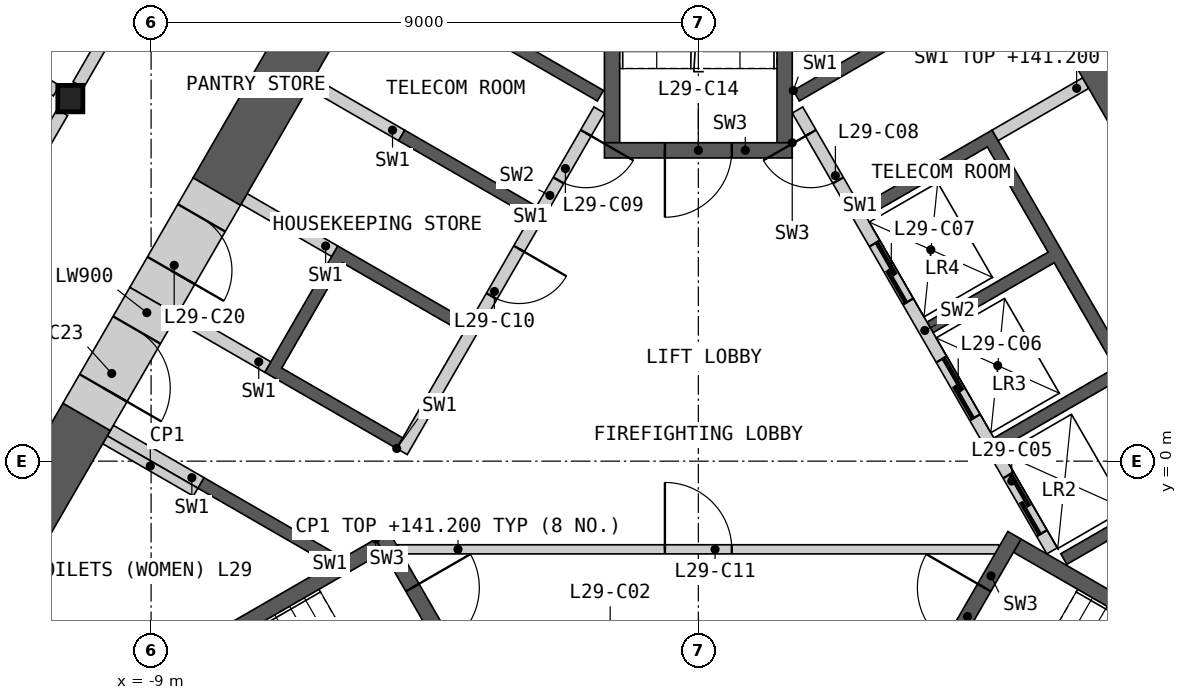
"""IFC4 building model, lengths in metres.
Left out: names, types, materials, properties, quantities, classifications, styles, units other than length and angle.
Written with IfcOpenShell. Run it as: python <this file> out.ifc"""

import sys

from ifc_helpers import new_model, si_unit, direction, frame, frame_2d, origin, origin_2d, place, context, subcontext, project, spatial, polyline, rectangle, i_section, outline, extrude, element, fill, save


model = new_model("IFC4")
c1 = context("Model", 3, precision=1e-05, world=origin(), true_north=direction((0.0, 1.0)))
c2 = subcontext(c1, "Body", "Model", "MODEL_VIEW")
j1 = project(units=[si_unit("LENGTHUNIT", "METRE"), si_unit("PLANEANGLEUNIT", "RADIAN")], contexts=[c1])
p1 = place(None, origin())
s1 = spatial("IfcSite", under=j1, at=p1, CompositionType="ELEMENT")
p2 = place(p1, origin())
s2 = spatial("IfcBuilding", under=s1, at=p2, CompositionType="ELEMENT")
p3 = place(p2, frame((0.0, 0.0, 137.4)))
s3 = spatial("IfcBuildingStorey", under=s2, at=p3, CompositionType="ELEMENT", Elevation=137.4)
p4 = place(p3, frame((-10.328, 5.963, 0.0), z_axis=(0.0, 0.0, 1.0), x_axis=(1.0, 0.0, 0.0)))
e1 = element("IfcColumn", 1, at=p4, inside=s3, PredefinedType="COLUMN", context=c2, shape_type="SweptSolid", body=[
    extrude(i_section(OverallWidth=0.412, OverallDepth=0.435, WebThickness=0.036, FlangeThickness=0.057, at=origin_2d()), origin(), (0.0, 0.0, 1.0), 4.2),
])
p5 = place(p3, origin())
e2 = element("IfcWall", 2, at=p5, inside=s3, PredefinedType="SHEAR", context=c2, shape_type="SweptSolid", body=[
    extrude(outline(polyline([(1.561, 6.097), (3.731, 7.35), (3.831, 7.177), (1.66, 5.924), (1.561, 6.097)])), origin(), (0.0, 0.0, 1.0), 3.8),
])
p6 = place(p3, origin())
e3 = element("IfcWall", 3, at=p6, inside=s3, PredefinedType="SHEAR", context=c2, shape_type="SweptSolid", body=[
    extrude(outline(polyline([(2.66, 4.192), (4.831, 5.445), (8.231, -0.444), (6.061, -1.697), (5.96, -1.524), (7.952, -0.374), (6.952, 1.358), (4.96, 0.208), (4.861, 0.381), (6.852, 1.531), (5.852, 3.263), (3.861, 2.113), (3.76, 2.287), (5.752, 3.437), (4.752, 5.169), (2.76, 4.019), (2.66, 4.192)])), origin(), (0.0, 0.0, 1.0), 3.8),
])
p7 = place(p3, frame((5.817, -1.476, 0.0), z_axis=(0.0, 0.0, 1.0), x_axis=(-0.500002616675, 0.866023893041, 0.0)))
e4 = element("IfcWall", 4, at=p7, inside=s3, PredefinedType="SOLIDWALL", context=c2, shape_type="SweptSolid", body=[
    extrude(rectangle(XDim=8.373, YDim=0.2, at=frame_2d((4.187, 0.0))), origin(), (0.0, 0.0, 1.0), 3.8),
])
p8 = place(p7, frame((0.337, 0.0, 0.0)))
e5 = element("IfcOpeningElement", 5, at=p8, cuts=e4, PredefinedType="OPENING", context=c2, shape_type="SweptSolid", body=[
    extrude(rectangle(XDim=1.1, YDim=2.1, at=frame_2d((0.55, 1.05))), frame((0.0, 0.11, 0.0), z_axis=(0.0, -1.0, 0.0), x_axis=(1.0, 0.0, 0.0)), (0.0, 0.0, 1.0), 0.22),
])
p9 = place(p7, frame((2.537, 0.0, 0.0)))
e6 = element("IfcOpeningElement", 6, at=p9, cuts=e4, PredefinedType="OPENING", context=c2, shape_type="SweptSolid", body=[
    extrude(rectangle(XDim=1.1, YDim=2.1, at=frame_2d((0.55, 1.05))), frame((0.0, 0.11, 0.0), z_axis=(0.0, -1.0, 0.0), x_axis=(1.0, 0.0, 0.0)), (0.0, 0.0, 1.0), 0.22),
])
p10 = place(p7, frame((4.737, 0.0, 0.0)))
e7 = element("IfcOpeningElement", 7, at=p10, cuts=e4, PredefinedType="OPENING", context=c2, shape_type="SweptSolid", body=[
    extrude(rectangle(XDim=1.1, YDim=2.1, at=frame_2d((0.55, 1.05))), frame((0.0, 0.11, 0.0), z_axis=(0.0, -1.0, 0.0), x_axis=(1.0, 0.0, 0.0)), (0.0, 0.0, 1.0), 0.22),
])
p11 = place(p7, frame((7.037, 0.0, 0.0)))
e8 = element("IfcOpeningElement", 8, at=p11, cuts=e4, PredefinedType="OPENING", context=c2, shape_type="SweptSolid", body=[
    extrude(rectangle(XDim=0.9, YDim=2.1, at=frame_2d((0.45, 1.05))), frame((0.0, 0.11, 0.0), z_axis=(0.0, -1.0, 0.0), x_axis=(1.0, 0.0, 0.0)), (0.0, 0.0, 1.0), 0.22),
])
p12 = place(p3, frame((4.881, 5.358, 0.0), z_axis=(0.0, 0.0, 1.0), x_axis=(0.866024871741, 0.500000921525, 0.0)))
e9 = element("IfcWall", 9, at=p12, inside=s3, PredefinedType="SHEAR", context=c2, shape_type="SweptSolid", body=[
    extrude(rectangle(XDim=1.72, YDim=0.2, at=frame_2d((0.86, 0.0))), origin(), (0.0, 0.0, 1.0), 3.8),
])
p13 = place(p3, origin())
e10 = element("IfcWall", 10, at=p13, inside=s3, PredefinedType="SHEAR", context=c2, shape_type="SweptSolid", body=[
    extrude(outline(polyline([(-6.061, -1.697), (-8.231, -0.444), (-8.131, -0.271), (-5.96, -1.524), (-6.061, -1.697)])), origin(), (0.0, 0.0, 1.0), 3.8),
])
p14 = place(p3, origin())
e11 = element("IfcWall", 11, at=p14, inside=s3, PredefinedType="SHEAR", context=c2, shape_type="SweptSolid", body=[
    extrude(outline(polyline([(-4.96, 0.208), (-7.131, 1.461), (-5.931, 3.54), (-3.76, 2.287), (-3.861, 2.113), (-5.852, 3.263), (-6.852, 1.531), (-4.861, 0.381), (-4.96, 0.208)])), origin(), (0.0, 0.0, 1.0), 3.8),
])
p15 = place(p3, origin())
e12 = element("IfcWall", 12, at=p15, inside=s3, PredefinedType="SHEAR", context=c2, shape_type="SweptSolid", body=[
    extrude(outline(polyline([(-2.76, 4.019), (-4.931, 5.272), (-4.831, 5.445), (-2.66, 4.192), (-2.76, 4.019)])), origin(), (0.0, 0.0, 1.0), 3.8),
])
p16 = place(p3, origin())
e13 = element("IfcWall", 13, at=p16, inside=s3, PredefinedType="SHEAR", context=c2, shape_type="SweptSolid", body=[
    extrude(outline(polyline([(-3.731, 7.35), (-1.561, 6.097), (-1.66, 5.924), (-3.831, 7.177), (-3.731, 7.35)])), origin(), (0.0, 0.0, 1.0), 3.8),
])
p17 = place(p3, frame((-1.631, 5.776, 0.0), z_axis=(0.0, 0.0, 1.0), x_axis=(-0.499992876559, -0.866029516466, 0.0)))
e14 = element("IfcWall", 14, at=p17, inside=s3, PredefinedType="SOLIDWALL", context=c2, shape_type="SweptSolid", body=[
    extrude(rectangle(XDim=6.486, YDim=0.2, at=frame_2d((3.243, 0.0))), origin(), (0.0, 0.0, 1.0), 3.8),
])
p18 = place(p17, frame((0.437, 0.0, 0.0)))
e15 = element("IfcOpeningElement", 15, at=p18, cuts=e14, PredefinedType="OPENING", context=c2, shape_type="SweptSolid", body=[
    extrude(rectangle(XDim=0.9, YDim=2.1, at=frame_2d((0.45, 1.05))), frame((0.0, 0.11, 0.0), z_axis=(0.0, -1.0, 0.0), x_axis=(1.0, 0.0, 0.0)), (0.0, 0.0, 1.0), 0.22),
])
p19 = place(p17, frame((2.637, 0.0, 0.0)))
e16 = element("IfcOpeningElement", 16, at=p19, cuts=e14, PredefinedType="OPENING", context=c2, shape_type="SweptSolid", body=[
    extrude(rectangle(XDim=0.9, YDim=2.1, at=frame_2d((0.45, 1.05))), frame((0.0, 0.11, 0.0), z_axis=(0.0, -1.0, 0.0), x_axis=(1.0, 0.0, 0.0)), (0.0, 0.0, 1.0), 0.22),
])
p20 = place(p3, frame((-4.881, 5.358, 0.0), z_axis=(0.0, 0.0, 1.0), x_axis=(-0.866024871741, 0.500000921525, 0.0)))
e17 = element("IfcWall", 17, at=p20, inside=s3, PredefinedType="SHEAR", context=c2, shape_type="SweptSolid", body=[
    extrude(rectangle(XDim=1.72, YDim=0.2, at=frame_2d((0.86, 0.0))), origin(), (0.0, 0.0, 1.0), 3.8),
])
p21 = place(p3, frame((-5.981, 3.453, 0.0), z_axis=(0.0, 0.0, 1.0), x_axis=(-0.866060346521, 0.499939472521, 0.0)))
e18 = element("IfcWall", 18, at=p21, inside=s3, PredefinedType="SHEAR", context=c2, shape_type="SweptSolid", body=[
    extrude(rectangle(XDim=1.72, YDim=0.2, at=frame_2d((0.86, 0.0))), origin(), (0.0, 0.0, 1.0), 3.8),
])
for number, where, z_axis, x_axis in (
    (19, (-7.081, 1.548, 0.0), (0.0, 0.0, 1.0), (-0.866, 0.5, 0.0)),
    (20, (-8.181, -0.357, 0.0), (0.0, 0.0, 1.0), (-0.866, 0.5, 0.0)),
):
    element("IfcWall", number, at=place(p3, frame(where, z_axis=z_axis, x_axis=x_axis)), inside=s3, PredefinedType="SHEAR", context=c2, shape_type="SweptSolid", body=[
        extrude(rectangle(XDim=1.72, YDim=0.2, at=frame_2d((0.86, 0.0))), origin(), (0.0, 0.0, 1.0), 3.8),
    ])
p22 = place(p3, frame((-4.941, -1.45, 0.0), z_axis=(0.0, 0.0, 1.0), x_axis=(1.0, 0.0, 0.0)))
e21 = element("IfcWall", 21, at=p22, inside=s3, PredefinedType="PARTITIONING", context=c2, shape_type="SweptSolid", body=[
    extrude(rectangle(XDim=9.882, YDim=0.15, at=frame_2d((4.941, 0.0))), origin(), (0.0, 0.0, 1.0), 3.8),
])
p23 = place(p22, frame((4.391, 0.0, 0.0)))
e22 = element("IfcOpeningElement", 22, at=p23, cuts=e21, PredefinedType="OPENING", context=c2, shape_type="SweptSolid", body=[
    extrude(rectangle(XDim=1.1, YDim=2.1, at=frame_2d((0.55, 1.05))), frame((0.0, 0.085, 0.0), z_axis=(0.0, -1.0, 0.0), x_axis=(1.0, 0.0, 0.0)), (0.0, 0.0, 1.0), 0.17),
])
p24 = place(p3, origin())
e23 = element("IfcWall", 23, at=p24, inside=s3, PredefinedType="SHEAR", context=c2, shape_type="SweptSolid", body=[
    extrude(outline(polyline([(-5.307, -1.281), (-10.374, -4.206), (-10.032, -4.298), (-5.182, -1.498), (-5.307, -1.281)])), origin(), (0.0, 0.0, 1.0), 3.8),
])
p25 = place(p3, frame((-5.199, -1.219, 0.0), z_axis=(0.0, 0.0, 1.0), x_axis=(0.499982516597, -0.866035497597, 0.0)))
e24 = element("IfcWall", 24, at=p25, inside=s3, PredefinedType="SHEAR", context=c2, shape_type="SweptSolid", body=[
    extrude(rectangle(XDim=3.088, YDim=0.25, at=frame_2d((1.544, 0.0))), origin(), (0.0, 0.0, 1.0), 3.8),
])
p26 = place(p25, frame((0.994, 0.0, 0.0)))
e25 = element("IfcOpeningElement", 25, at=p26, cuts=e24, PredefinedType="OPENING", context=c2, shape_type="SweptSolid", body=[
    extrude(rectangle(XDim=1.1, YDim=2.1, at=frame_2d((0.55, 1.05))), frame((0.0, 0.135, 0.0), z_axis=(0.0, -1.0, 0.0), x_axis=(1.0, 0.0, 0.0)), (0.0, 0.0, 1.0), 0.27),
])
p27 = place(p3, origin())
e26 = element("IfcWall", 26, at=p27, inside=s3, PredefinedType="SHEAR", context=c2, shape_type="SweptSolid", body=[
    extrude(outline(polyline([(10.032, -4.298), (10.374, -4.206), (5.307, -1.281), (5.182, -1.498), (10.032, -4.298)])), origin(), (0.0, 0.0, 1.0), 3.8),
])
p28 = place(p3, frame((3.655, -3.893, 0.0), z_axis=(0.0, 0.0, 1.0), x_axis=(0.499982516597, 0.866035497597, 0.0)))
e27 = element("IfcWall", 27, at=p28, inside=s3, PredefinedType="SHEAR", context=c2, shape_type="SweptSolid", body=[
    extrude(rectangle(XDim=3.088, YDim=0.25, at=frame_2d((1.544, 0.0))), origin(), (0.0, 0.0, 1.0), 3.8),
])
p29 = place(p28, frame((0.994, 0.0, 0.0)))
e28 = element("IfcOpeningElement", 28, at=p29, cuts=e27, PredefinedType="OPENING", context=c2, shape_type="SweptSolid", body=[
    extrude(rectangle(XDim=1.1, YDim=2.1, at=frame_2d((0.55, 1.05))), frame((0.0, 0.135, 0.0), z_axis=(0.0, -1.0, 0.0), x_axis=(1.0, 0.0, 0.0)), (0.0, 0.0, 1.0), 0.27),
])
p30 = place(p3, origin())
e29 = element("IfcWall", 29, at=p30, inside=s3, PredefinedType="SHEAR", context=c2, shape_type="SweptSolid", body=[
    extrude(outline(polyline([(1.544, 5.237), (1.544, 11.087), (1.294, 10.837), (1.294, 5.237), (1.544, 5.237)])), origin(), (0.0, 0.0, 1.0), 3.8),
])
p31 = place(p3, origin())
e30 = element("IfcWall", 30, at=p31, inside=s3, PredefinedType="SHEAR", context=c2, shape_type="SweptSolid", body=[
    extrude(outline(polyline([(-1.294, 10.837), (-1.544, 11.087), (-1.544, 5.237), (-1.294, 5.237), (-1.294, 10.837)])), origin(), (0.0, 0.0, 1.0), 3.8),
])
p32 = place(p3, frame((1.544, 5.112, 0.0), z_axis=(0.0, 0.0, 1.0), x_axis=(-1.0, 0.0, 0.0)))
e31 = element("IfcWall", 31, at=p32, inside=s3, PredefinedType="SHEAR", context=c2, shape_type="SweptSolid", body=[
    extrude(rectangle(XDim=3.088, YDim=0.25, at=frame_2d((1.544, 0.0))), origin(), (0.0, 0.0, 1.0), 3.8),
])
p33 = place(p32, frame((0.994, 0.0, 0.0)))
e32 = element("IfcOpeningElement", 32, at=p33, cuts=e31, PredefinedType="OPENING", context=c2, shape_type="SweptSolid", body=[
    extrude(rectangle(XDim=1.1, YDim=2.1, at=frame_2d((0.55, 1.05))), frame((0.0, 0.135, 0.0), z_axis=(0.0, -1.0, 0.0), x_axis=(1.0, 0.0, 0.0)), (0.0, 0.0, 1.0), 0.27),
])
p34 = place(p3, frame((-8.268, -0.509, 0.0), z_axis=(0.0, 0.0, 1.0), x_axis=(-0.866024871741, 0.500000921525, 0.0)))
e33 = element("IfcWall", 33, at=p34, inside=s3, PredefinedType="PARTITIONING", context=c2, shape_type="SweptSolid", body=[
    extrude(rectangle(XDim=1.72, YDim=0.15, at=frame_2d((0.86, 0.0))), origin(), (0.0, 0.0, 1.0), 3.8),
])
p35 = place(p3, frame((10.521, -0.07, 0.0), z_axis=(0.0, 0.0, 1.0), x_axis=(-0.499997384719, 0.866026913713, 0.0)))
e34 = element("IfcWall", 34, at=p35, inside=s3, PredefinedType="SHEAR", context=c2, shape_type="SweptSolid", body=[
    extrude(rectangle(XDim=10.249, YDim=0.9, at=frame_2d((5.125, 0.0))), origin(), (0.0, 0.0, 1.0), 3.8),
])
p36 = place(p3, frame((-3.512, 12.069, 0.0), z_axis=(0.0, 0.0, 1.0), x_axis=(-0.500002126466, -0.866024176065, 0.0)))
e35 = element("IfcWall", 35, at=p36, inside=s3, PredefinedType="SHEAR", context=c2, shape_type="SweptSolid", body=[
    extrude(rectangle(XDim=8.816, YDim=0.9, at=frame_2d((4.408, 0.0))), origin(), (0.0, 0.0, 1.0), 3.8),
])
p37 = place(p3, frame((-10.06, 0.728, 0.0), z_axis=(0.0, 0.0, 1.0), x_axis=(-0.500002975332, -0.866023685969, 0.0)))
e36 = element("IfcWall", 36, at=p37, inside=s3, PredefinedType="SHEAR", context=c2, shape_type="SweptSolid", body=[
    extrude(rectangle(XDim=6.429, YDim=0.9, at=frame_2d((3.214, 0.0))), origin(), (0.0, 0.0, 1.0), 3.8),
])
p38 = place(p3, frame((-7.92, 4.434, 0.0), z_axis=(0.0, 0.0, 1.0), x_axis=(-0.499939227269, -0.866060488094, 0.0)))
e37 = element("IfcWall", 37, at=p38, inside=s3, PredefinedType="SHEAR", context=c2, shape_type="SweptSolid", body=[
    extrude(rectangle(XDim=2.08, YDim=0.9, at=frame_2d((1.04, 0.0))), origin(), (0.0, 0.0, 1.0), 3.8),
])
p39 = place(p38, frame((0.5, 0.0, 0.0)))
e38 = element("IfcOpeningElement", 38, at=p39, cuts=e37, PredefinedType="OPENING", context=c2, shape_type="SweptSolid", body=[
    extrude(rectangle(XDim=1.0, YDim=2.1, at=frame_2d((0.5, 1.05))), frame((0.0, 0.46, 0.0), z_axis=(0.0, -1.0, 0.0), x_axis=(1.0, 0.0, 0.0)), (0.0, 0.0, 1.0), 0.92),
])
p40 = place(p3, frame((-8.96, 2.633, 0.0), z_axis=(0.0, 0.0, 1.0), x_axis=(-0.50002983664, -0.866008176907, 0.0)))
e39 = element("IfcWall", 39, at=p40, inside=s3, PredefinedType="SHEAR", context=c2, shape_type="SweptSolid", body=[
    extrude(rectangle(XDim=2.2, YDim=0.9, at=frame_2d((1.1, 0.0))), origin(), (0.0, 0.0, 1.0), 3.8),
])
p41 = place(p40, frame((0.55, 0.0, 0.0)))
e40 = element("IfcOpeningElement", 40, at=p41, cuts=e39, PredefinedType="OPENING", context=c2, shape_type="SweptSolid", body=[
    extrude(rectangle(XDim=1.1, YDim=2.1, at=frame_2d((0.55, 1.05))), frame((0.0, 0.46, 0.0), z_axis=(0.0, -1.0, 0.0), x_axis=(1.0, 0.0, 0.0)), (0.0, 0.0, 1.0), 0.92),
])
p42 = place(p3, frame((-15.361, -2.754, 0.0), z_axis=(0.0, 0.0, 1.0), x_axis=(0.500004141693, 0.866023012564, 0.0)))
e41 = element("IfcWall", 41, at=p42, inside=s3, PredefinedType="PARTITIONING", context=c2, shape_type="SweptSolid", body=[
    extrude(rectangle(XDim=9.803, YDim=0.2, at=frame_2d((4.902, 0.0))), origin(), (0.0, 0.0, 1.0), 3.8),
])
p43 = place(p42, frame((4.452, 0.0, 0.0)))
e42 = element("IfcOpeningElement", 42, at=p43, cuts=e41, PredefinedType="OPENING", context=c2, shape_type="SweptSolid", body=[
    extrude(rectangle(XDim=1.0, YDim=2.1, at=frame_2d((0.5, 1.05))), frame((0.0, 0.11, 0.0), z_axis=(0.0, -1.0, 0.0), x_axis=(1.0, 0.0, 0.0)), (0.0, 0.0, 1.0), 0.22),
])
p44 = place(p3, frame((5.295, 14.68, 0.0), z_axis=(0.0, 0.0, 1.0), x_axis=(0.500012035596, -0.866018454918, 0.0)))
e43 = element("IfcWall", 43, at=p44, inside=s3, PredefinedType="PARTITIONING", context=c2, shape_type="SweptSolid", body=[
    extrude(rectangle(XDim=9.803, YDim=0.2, at=frame_2d((4.902, 0.0))), origin(), (0.0, 0.0, 1.0), 3.8),
])
p45 = place(p44, frame((4.052, 0.0, 0.0)))
e44 = element("IfcOpeningElement", 44, at=p45, cuts=e43, PredefinedType="OPENING", context=c2, shape_type="SweptSolid", body=[
    extrude(rectangle(XDim=1.8, YDim=2.1, at=frame_2d((0.9, 1.05))), frame((0.0, 0.11, 0.0), z_axis=(0.0, -1.0, 0.0), x_axis=(1.0, 0.0, 0.0)), (0.0, 0.0, 1.0), 0.22),
])
p46 = place(p3, frame((-10.197, 6.19, 0.0), z_axis=(0.0, 0.0, 1.0), x_axis=(0.500012035596, 0.866018454918, 0.0)))
e45 = element("IfcWall", 45, at=p46, inside=s3, PredefinedType="PARTITIONING", context=c2, shape_type="SweptSolid", body=[
    extrude(rectangle(XDim=9.803, YDim=0.2, at=frame_2d((4.902, 0.0))), origin(), (0.0, 0.0, 1.0), 3.8),
])
p47 = place(p46, frame((6.853, 0.0, 0.0)))
e46 = element("IfcOpeningElement", 46, at=p47, cuts=e45, PredefinedType="OPENING", context=c2, shape_type="SweptSolid", body=[
    extrude(rectangle(XDim=1.0, YDim=2.1, at=frame_2d((0.5, 1.05))), frame((0.0, 0.11, 0.0), z_axis=(0.0, -1.0, 0.0), x_axis=(1.0, 0.0, 0.0)), (0.0, 0.0, 1.0), 0.22),
])
p48 = place(p46, frame((1.851, 0.0, 0.0)))
e47 = element("IfcOpeningElement", 47, at=p48, cuts=e45, PredefinedType="OPENING", context=c2, shape_type="SweptSolid", body=[
    extrude(rectangle(XDim=1.0, YDim=2.1, at=frame_2d((0.5, 1.05))), frame((0.0, 0.11, 0.0), z_axis=(0.0, -1.0, 0.0), x_axis=(1.0, 0.0, 0.0)), (0.0, 0.0, 1.0), 0.22),
])
p49 = place(p3, frame((-21.536, 12.434, 0.0), z_axis=(0.0, 0.0, 1.0), x_axis=(0.86602461759, -0.500001361726, 0.0)))
e48 = element("IfcWall", 48, at=p49, inside=s3, PredefinedType="PARTITIONING", context=c2, shape_type="SweptSolid", body=[
    extrude(rectangle(XDim=12.679, YDim=0.2, at=frame_2d((6.34, 0.0))), origin(), (0.0, 0.0, 1.0), 2.885),
])
p50 = place(p8, origin())
e49 = element("IfcDoor", 49, at=p50, inside=s3, OperationType="SLIDING_TO_LEFT", PredefinedType="DOOR", context=c2, shape_type="SweptSolid", body=[
    extrude(rectangle(XDim=1.1, YDim=2.1, at=frame_2d((0.55, 1.05))), frame((0.0, 0.025, 0.0), z_axis=(0.0, -1.0, 0.0), x_axis=(1.0, 0.0, 0.0)), (0.0, 0.0, 1.0), 0.05),
])
fill(e5, e49)
p51 = place(p9, origin())
e50 = element("IfcDoor", 50, at=p51, inside=s3, OperationType="SLIDING_TO_LEFT", PredefinedType="DOOR", context=c2, shape_type="SweptSolid", body=[
    extrude(rectangle(XDim=1.1, YDim=2.1, at=frame_2d((0.55, 1.05))), frame((0.0, 0.025, 0.0), z_axis=(0.0, -1.0, 0.0), x_axis=(1.0, 0.0, 0.0)), (0.0, 0.0, 1.0), 0.05),
])
fill(e6, e50)
p52 = place(p10, origin())
e51 = element("IfcDoor", 51, at=p52, inside=s3, OperationType="SLIDING_TO_LEFT", PredefinedType="DOOR", context=c2, shape_type="SweptSolid", body=[
    extrude(rectangle(XDim=1.1, YDim=2.1, at=frame_2d((0.55, 1.05))), frame((0.0, 0.025, 0.0), z_axis=(0.0, -1.0, 0.0), x_axis=(1.0, 0.0, 0.0)), (0.0, 0.0, 1.0), 0.05),
])
fill(e7, e51)
p53 = place(p11, origin())
e52 = element("IfcDoor", 52, at=p53, inside=s3, OperationType="SINGLE_SWING_RIGHT", PredefinedType="DOOR", context=c2, shape_type="SweptSolid", body=[
    extrude(rectangle(XDim=0.9, YDim=2.1, at=frame_2d((0.45, 1.05))), frame((0.0, 0.025, 0.0), z_axis=(0.0, -1.0, 0.0), x_axis=(1.0, 0.0, 0.0)), (0.0, 0.0, 1.0), 0.05),
])
fill(e8, e52)
p54 = place(p18, origin())
e53 = element("IfcDoor", 53, at=p54, inside=s3, OperationType="SINGLE_SWING_LEFT", PredefinedType="DOOR", context=c2, shape_type="SweptSolid", body=[
    extrude(rectangle(XDim=0.9, YDim=2.1, at=frame_2d((0.45, 1.05))), frame((0.0, 0.025, 0.0), z_axis=(0.0, -1.0, 0.0), x_axis=(1.0, 0.0, 0.0)), (0.0, 0.0, 1.0), 0.05),
])
fill(e15, e53)
p55 = place(p19, origin())
e54 = element("IfcDoor", 54, at=p55, inside=s3, OperationType="SINGLE_SWING_LEFT", PredefinedType="DOOR", context=c2, shape_type="SweptSolid", body=[
    extrude(rectangle(XDim=0.9, YDim=2.1, at=frame_2d((0.45, 1.05))), frame((0.0, 0.025, 0.0), z_axis=(0.0, -1.0, 0.0), x_axis=(1.0, 0.0, 0.0)), (0.0, 0.0, 1.0), 0.05),
])
fill(e16, e54)
p56 = place(p23, origin())
e55 = element("IfcDoor", 55, at=p56, inside=s3, OperationType="SINGLE_SWING_LEFT", PredefinedType="DOOR", context=c2, shape_type="SweptSolid", body=[
    extrude(rectangle(XDim=1.1, YDim=2.1, at=frame_2d((0.55, 1.05))), frame((0.0, 0.025, 0.0), z_axis=(0.0, -1.0, 0.0), x_axis=(1.0, 0.0, 0.0)), (0.0, 0.0, 1.0), 0.05),
])
fill(e22, e55)
p57 = place(p26, origin())
e56 = element("IfcDoor", 56, at=p57, inside=s3, OperationType="SINGLE_SWING_LEFT", PredefinedType="DOOR", context=c2, shape_type="SweptSolid", body=[
    extrude(rectangle(XDim=1.1, YDim=2.1, at=frame_2d((0.55, 1.05))), frame((0.0, 0.025, 0.0), z_axis=(0.0, -1.0, 0.0), x_axis=(1.0, 0.0, 0.0)), (0.0, 0.0, 1.0), 0.05),
])
fill(e25, e56)
p58 = place(p29, origin())
e57 = element("IfcDoor", 57, at=p58, inside=s3, OperationType="SINGLE_SWING_RIGHT", PredefinedType="DOOR", context=c2, shape_type="SweptSolid", body=[
    extrude(rectangle(XDim=1.1, YDim=2.1, at=frame_2d((0.55, 1.05))), frame((0.0, 0.025, 0.0), z_axis=(0.0, -1.0, 0.0), x_axis=(1.0, 0.0, 0.0)), (0.0, 0.0, 1.0), 0.05),
])
fill(e28, e57)
p59 = place(p33, origin())
e58 = element("IfcDoor", 58, at=p59, inside=s3, OperationType="SINGLE_SWING_RIGHT", PredefinedType="DOOR", context=c2, shape_type="SweptSolid", body=[
    extrude(rectangle(XDim=1.1, YDim=2.1, at=frame_2d((0.55, 1.05))), frame((0.0, 0.025, 0.0), z_axis=(0.0, -1.0, 0.0), x_axis=(1.0, 0.0, 0.0)), (0.0, 0.0, 1.0), 0.05),
])
fill(e32, e58)
p60 = place(p39, origin())
e59 = element("IfcDoor", 59, at=p60, inside=s3, OperationType="SINGLE_SWING_RIGHT", PredefinedType="DOOR", context=c2, shape_type="SweptSolid", body=[
    extrude(rectangle(XDim=1.0, YDim=2.1, at=frame_2d((0.5, 1.05))), frame((0.0, 0.205, 0.0), z_axis=(0.0, -1.0, 0.0), x_axis=(1.0, 0.0, 0.0)), (0.0, 0.0, 1.0), 0.05),
])
fill(e38, e59)
p61 = place(p41, origin())
e60 = element("IfcDoor", 60, at=p61, inside=s3, OperationType="SINGLE_SWING_RIGHT", PredefinedType="DOOR", context=c2, shape_type="SweptSolid", body=[
    extrude(rectangle(XDim=1.1, YDim=2.1, at=frame_2d((0.55, 1.05))), frame((0.0, 0.205, 0.0), z_axis=(0.0, -1.0, 0.0), x_axis=(1.0, 0.0, 0.0)), (0.0, 0.0, 1.0), 0.05),
])
fill(e40, e60)
save(model, sys.argv[1])
